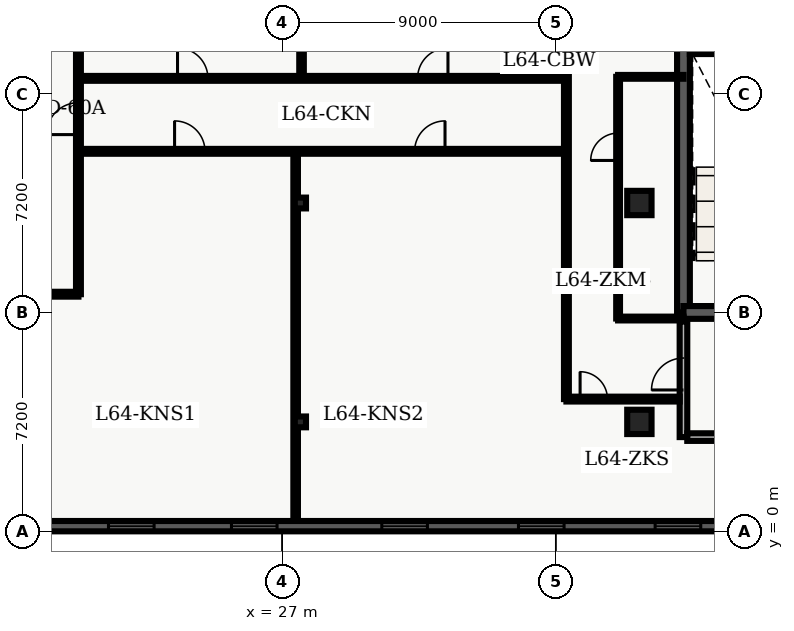
"""IFC4 building model, lengths in metres.
Left out: names, types, materials, properties, quantities, classifications, styles, units other than length and angle.
Written with IfcOpenShell. Run it as: python <this file> out.ifc"""

import sys

from ifc_helpers import new_model, entity, si_unit, converted_unit, direction, frame, origin_with_axes, origin_2d_with_axis, place, context, subcontext, project, spatial, polyline, rectangle, i_section, outline, extrude, element, fill, save


model = new_model("IFC4")
c1 = context("Model", 3, precision=1e-05, world=origin_with_axes(), true_north=direction((0.0, 1.0)))
c2 = subcontext(c1, "Body", "Model", "MODEL_VIEW")
j1 = project(units=[si_unit("LENGTHUNIT", "METRE"), converted_unit("PLANEANGLEUNIT", "DEGREE", entity("IfcPlaneAngleMeasure", 0.017), si_unit("PLANEANGLEUNIT", "RADIAN"), dimensions=[0, 0, 0, 0, 0, 0, 0])], contexts=[c1])
p1 = place(None, origin_with_axes())
s1 = spatial("IfcSite", under=j1, at=p1, CompositionType="ELEMENT")
p2 = place(p1, origin_with_axes())
s2 = spatial("IfcBuilding", under=s1, at=p2, CompositionType="ELEMENT")
p3 = place(p2, frame((0.0, 0.0, 260.7), z_axis=(0.0, 0.0, 1.0), x_axis=(1.0, 0.0, 0.0)))
s3 = spatial("IfcBuildingStorey", under=s2, at=p3, CompositionType="ELEMENT", Elevation=260.7)
p4 = place(p3, frame((40.2, 7.2, 0.0), z_axis=(0.0, 0.0, 1.0), x_axis=(0.0, 1.0, 0.0)))
e1 = element("IfcWall", 1, at=p4, inside=s3, PredefinedType="SHEAR", context=c2, shape_type="SweptSolid", body=[
    extrude(outline(polyline([(0.0, -0.21), (15.6, -0.21), (15.6, 0.21), (0.0, 0.21), (0.0, -0.21)])), origin_with_axes(), (0.0, 0.0, 1.0), 3.66),
])
p5 = place(p4, frame((12.75, 0.0, 0.0), z_axis=(0.0, 0.0, 1.0), x_axis=(1.0, 0.0, 0.0)))
e2 = element("IfcOpeningElement", 2, at=p5, cuts=e1, PredefinedType="OPENING", context=c2, shape_type="SweptSolid", body=[
    extrude(rectangle(XDim=1.2, YDim=0.44, at=origin_2d_with_axis()), origin_with_axes(), (0.0, 0.0, 1.0), 2.15),
])
p6 = place(p4, frame((9.3, 0.0, 0.0), z_axis=(0.0, 0.0, 1.0), x_axis=(1.0, 0.0, 0.0)))
e3 = element("IfcOpeningElement", 3, at=p6, cuts=e1, PredefinedType="OPENING", context=c2, shape_type="SweptSolid", body=[
    extrude(rectangle(XDim=0.9, YDim=0.44, at=origin_2d_with_axis()), origin_with_axes(), (0.0, 0.0, 1.0), 2.15),
])
p7 = place(p3, frame((40.2, 7.2, 0.0), z_axis=(0.0, 0.0, 1.0), x_axis=(1.0, 0.0, 0.0)))
e4 = element("IfcWall", 4, at=p7, inside=s3, PredefinedType="SHEAR", context=c2, shape_type="SweptSolid", body=[
    extrude(outline(polyline([(0.0, -0.21), (7.85, -0.21), (7.85, 0.21), (0.0, 0.21), (0.0, -0.21)])), origin_with_axes(), (0.0, 0.0, 1.0), 3.66),
])
p8 = place(p7, frame((2.175, 0.0, 0.0), z_axis=(0.0, 0.0, 1.0), x_axis=(1.0, 0.0, 0.0)))
e5 = element("IfcOpeningElement", 5, at=p8, cuts=e4, PredefinedType="OPENING", context=c2, shape_type="SweptSolid", body=[
    extrude(rectangle(XDim=1.05, YDim=0.44, at=origin_2d_with_axis()), origin_with_axes(), (0.0, 0.0, 1.0), 2.15),
])
p9 = place(p3, frame((40.41, 15.825, 0.0), z_axis=(0.0, 0.0, 1.0), x_axis=(1.0, 0.0, 0.0)))
e6 = element("IfcWall", 6, at=p9, inside=s3, PredefinedType="SHEAR", context=c2, shape_type="SweptSolid", body=[
    extrude(outline(polyline([(0.0, -0.125), (3.59, -0.125), (3.59, 0.125), (0.0, 0.125), (0.0, -0.125)])), origin_with_axes(), (0.0, 0.0, 1.0), 3.66),
])
p10 = place(p3, frame((40.2, 3.1, 0.0), z_axis=(0.0, 0.0, 1.0), x_axis=(0.0, 1.0, 0.0)))
e7 = element("IfcWall", 7, at=p10, inside=s3, PredefinedType="SOLIDWALL", context=c2, shape_type="SweptSolid", body=[
    extrude(outline(polyline([(0.0, -0.125), (3.8, -0.125), (3.8, 0.125), (0.0, 0.125), (0.0, -0.125)])), origin_with_axes(), (0.0, 0.0, 1.0), 2.7),
])
p11 = place(p10, frame((2.075, 0.0, 0.0), z_axis=(0.0, 0.0, 1.0), x_axis=(1.0, 0.0, 0.0)))
e8 = element("IfcOpeningElement", 8, at=p11, cuts=e7, PredefinedType="OPENING", context=c2, shape_type="SweptSolid", body=[
    extrude(rectangle(XDim=1.05, YDim=0.27, at=origin_2d_with_axis()), origin_with_axes(), (0.0, 0.0, 1.0), 2.15),
])
p12 = place(p3, frame((40.325, 3.1, 0.0), z_axis=(0.0, 0.0, 1.0), x_axis=(1.0, 0.0, 0.0)))
e9 = element("IfcWall", 9, at=p12, inside=s3, PredefinedType="SOLIDWALL", context=c2, shape_type="SweptSolid", body=[
    extrude(outline(polyline([(0.0, -0.125), (3.95, -0.125), (3.95, 0.125), (0.0, 0.125), (0.0, -0.125)])), origin_with_axes(), (0.0, 0.0, 1.0), 2.7),
])
for number, where, z_axis, x_axis in (
    (10, (27.6, 3.6, 0.0), (0.0, 0.0, 1.0), (1.0, 0.0, 0.0)),
    (11, (27.6, 10.8, 0.0), (0.0, 0.0, 1.0), (1.0, 0.0, 0.0)),
):
    element("IfcColumn", number, at=place(p3, frame(where, z_axis=z_axis, x_axis=x_axis)), inside=s3, PredefinedType="COLUMN", context=c2, shape_type="SweptSolid", body=[
        extrude(i_section(OverallWidth=0.369, OverallDepth=0.356, WebThickness=0.011, FlangeThickness=0.018, FilletRadius=0.018, at=origin_2d_with_axis()), origin_with_axes(), (0.0, 0.0, 1.0), 3.9),
    ])
for number, where, z_axis, x_axis in (
    (12, (38.75, 3.6, 0.0), (0.0, 0.0, 1.0), (1.0, 0.0, 0.0)),
    (13, (38.75, 10.8, 0.0), (0.0, 0.0, 1.0), (1.0, 0.0, 0.0)),
):
    element("IfcColumn", number, at=place(p3, frame(where, z_axis=z_axis, x_axis=x_axis)), inside=s3, PredefinedType="COLUMN", context=c2, shape_type="SweptSolid", body=[
        extrude(rectangle(XDim=0.8, YDim=0.8, at=origin_2d_with_axis()), origin_with_axes(), (0.0, 0.0, 1.0), 3.9),
    ])
p13 = place(p3, frame((8.135, 7.8, 0.0), z_axis=(0.0, 0.0, 1.0), x_axis=(1.0, 0.0, 0.0)))
e14 = element("IfcWall", 14, at=p13, inside=s3, PredefinedType="PARTITIONING", context=c2, shape_type="SweptSolid", body=[
    extrude(outline(polyline([(0.0, -0.08), (12.165, -0.08), (12.165, 0.08), (0.0, 0.08), (0.0, -0.08)])), origin_with_axes(), (0.0, 0.0, 1.0), 2.7),
])
p14 = place(p13, frame((3.979, 0.0, 0.0), z_axis=(0.0, 0.0, 1.0), x_axis=(1.0, 0.0, 0.0)))
e15 = element("IfcOpeningElement", 15, at=p14, cuts=e14, PredefinedType="OPENING", context=c2, shape_type="SweptSolid", body=[
    extrude(rectangle(XDim=1.0, YDim=0.18, at=origin_2d_with_axis()), origin_with_axes(), (0.0, 0.0, 1.0), 2.15),
])
p15 = place(p13, frame((8.778, 0.0, 0.0), z_axis=(0.0, 0.0, 1.0), x_axis=(1.0, 0.0, 0.0)))
e16 = element("IfcOpeningElement", 16, at=p15, cuts=e14, PredefinedType="OPENING", context=c2, shape_type="SweptSolid", body=[
    extrude(rectangle(XDim=1.0, YDim=0.18, at=origin_2d_with_axis()), origin_with_axes(), (0.0, 0.0, 1.0), 2.15),
])
p16 = place(p3, frame((20.3, 7.8, 0.0), z_axis=(0.0, 0.0, 1.0), x_axis=(0.0, 1.0, 0.0)))
e17 = element("IfcWall", 17, at=p16, inside=s3, PredefinedType="PARTITIONING", context=c2, shape_type="SweptSolid", body=[
    extrude(outline(polyline([(0.0, -0.08), (32.7, -0.08), (32.7, 0.08), (0.0, 0.08), (0.0, -0.08)])), origin_with_axes(), (0.0, 0.0, 1.0), 2.7),
])
p17 = place(p16, frame((17.825, 0.0, 0.0), z_axis=(0.0, 0.0, 1.0), x_axis=(1.0, 0.0, 0.0)))
e18 = element("IfcOpeningElement", 18, at=p17, cuts=e17, PredefinedType="OPENING", context=c2, shape_type="SweptSolid", body=[
    extrude(rectangle(XDim=1.0, YDim=0.18, at=origin_2d_with_axis()), origin_with_axes(), (0.0, 0.0, 1.0), 2.15),
])
p18 = place(p16, frame((27.345, 0.0, 0.0), z_axis=(0.0, 0.0, 1.0), x_axis=(1.0, 0.0, 0.0)))
e19 = element("IfcOpeningElement", 19, at=p18, cuts=e17, PredefinedType="OPENING", context=c2, shape_type="SweptSolid", body=[
    extrude(rectangle(XDim=1.0, YDim=0.18, at=origin_2d_with_axis()), origin_with_axes(), (0.0, 0.0, 1.0), 2.15),
])
p19 = place(p16, frame((5.775, 0.0, 0.0), z_axis=(0.0, 0.0, 1.0), x_axis=(1.0, 0.0, 0.0)))
e20 = element("IfcOpeningElement", 20, at=p19, cuts=e17, PredefinedType="OPENING", context=c2, shape_type="SweptSolid", body=[
    extrude(rectangle(XDim=1.05, YDim=0.18, at=origin_2d_with_axis()), origin_with_axes(), (0.0, 0.0, 1.0), 2.15),
])
p20 = place(p3, frame((20.3, 12.5, 0.0), z_axis=(0.0, 0.0, 1.0), x_axis=(1.0, 0.0, 0.0)))
e21 = element("IfcWall", 21, at=p20, inside=s3, PredefinedType="PARTITIONING", context=c2, shape_type="SweptSolid", body=[
    extrude(outline(polyline([(0.0, -0.08), (16.05, -0.08), (16.05, 0.08), (0.0, 0.08), (0.0, -0.08)])), origin_with_axes(), (0.0, 0.0, 1.0), 2.7),
])
p21 = place(p20, frame((3.662, 0.0, 0.0), z_axis=(0.0, 0.0, 1.0), x_axis=(1.0, 0.0, 0.0)))
e22 = element("IfcOpeningElement", 22, at=p21, cuts=e21, PredefinedType="OPENING", context=c2, shape_type="SweptSolid", body=[
    extrude(rectangle(XDim=1.0, YDim=0.18, at=origin_2d_with_axis()), origin_with_axes(), (0.0, 0.0, 1.0), 2.15),
])
p22 = place(p20, frame((11.557, 0.0, 0.0), z_axis=(0.0, 0.0, 1.0), x_axis=(1.0, 0.0, 0.0)))
e23 = element("IfcOpeningElement", 23, at=p22, cuts=e21, PredefinedType="OPENING", context=c2, shape_type="SweptSolid", body=[
    extrude(rectangle(XDim=1.0, YDim=0.18, at=origin_2d_with_axis()), origin_with_axes(), (0.0, 0.0, 1.0), 2.15),
])
p23 = place(p3, frame((20.3, 14.9, 0.0), z_axis=(0.0, 0.0, 1.0), x_axis=(1.0, 0.0, 0.0)))
e24 = element("IfcWall", 24, at=p23, inside=s3, PredefinedType="PARTITIONING", context=c2, shape_type="SweptSolid", body=[
    extrude(outline(polyline([(0.0, -0.08), (16.05, -0.08), (16.05, 0.08), (0.0, 0.08), (0.0, -0.08)])), origin_with_axes(), (0.0, 0.0, 1.0), 2.7),
])
p24 = place(p23, frame((3.759, 0.0, 0.0), z_axis=(0.0, 0.0, 1.0), x_axis=(1.0, 0.0, 0.0)))
e25 = element("IfcOpeningElement", 25, at=p24, cuts=e24, PredefinedType="OPENING", context=c2, shape_type="SweptSolid", body=[
    extrude(rectangle(XDim=1.0, YDim=0.18, at=origin_2d_with_axis()), origin_with_axes(), (0.0, 0.0, 1.0), 2.15),
])
p25 = place(p23, frame((11.654, 0.0, 0.0), z_axis=(0.0, 0.0, 1.0), x_axis=(1.0, 0.0, 0.0)))
e26 = element("IfcOpeningElement", 26, at=p25, cuts=e24, PredefinedType="OPENING", context=c2, shape_type="SweptSolid", body=[
    extrude(rectangle(XDim=1.0, YDim=0.18, at=origin_2d_with_axis()), origin_with_axes(), (0.0, 0.0, 1.0), 2.15),
])
p26 = place(p3, frame((36.35, 4.35, 0.0), z_axis=(0.0, 0.0, 1.0), x_axis=(0.0, 1.0, 0.0)))
e27 = element("IfcWall", 27, at=p26, inside=s3, PredefinedType="PARTITIONING", context=c2, shape_type="SweptSolid", body=[
    extrude(outline(polyline([(0.0, -0.08), (16.95, -0.08), (16.95, 0.08), (0.0, 0.08), (0.0, -0.08)])), origin_with_axes(), (0.0, 0.0, 1.0), 2.7),
])
p27 = place(p3, frame((27.444, 0.335, 0.0), z_axis=(0.0, 0.0, 1.0), x_axis=(0.0, 1.0, 0.0)))
e28 = element("IfcWall", 28, at=p27, inside=s3, PredefinedType="PARTITIONING", context=c2, shape_type="SweptSolid", body=[
    extrude(outline(polyline([(0.0, -0.075), (12.045, -0.075), (12.045, 0.075), (0.0, 0.075), (0.0, -0.075)])), origin_with_axes(), (0.0, 0.0, 1.0), 2.7),
])
p28 = place(p3, frame((27.638, 15.02, 0.0), z_axis=(0.0, 0.0, 1.0), x_axis=(0.0, 1.0, 0.0)))
e29 = element("IfcWall", 29, at=p28, inside=s3, PredefinedType="PARTITIONING", context=c2, shape_type="SweptSolid", body=[
    extrude(outline(polyline([(0.0, -0.075), (6.2, -0.075), (6.2, 0.075), (0.0, 0.075), (0.0, -0.075)])), origin_with_axes(), (0.0, 0.0, 1.0), 2.7),
])
p29 = place(p3, frame((36.35, 4.35, 0.0), z_axis=(0.0, 0.0, 1.0), x_axis=(1.0, 0.0, 0.0)))
e30 = element("IfcWall", 30, at=p29, inside=s3, PredefinedType="PARTITIONING", context=c2, shape_type="SweptSolid", body=[
    extrude(outline(polyline([(0.0, -0.08), (3.725, -0.08), (3.725, 0.08), (0.0, 0.08), (0.0, -0.08)])), origin_with_axes(), (0.0, 0.0, 1.0), 2.7),
])
p30 = place(p29, frame((0.9, 0.0, 0.0), z_axis=(0.0, 0.0, 1.0), x_axis=(1.0, 0.0, 0.0)))
e31 = element("IfcOpeningElement", 31, at=p30, cuts=e30, PredefinedType="OPENING", context=c2, shape_type="SweptSolid", body=[
    extrude(rectangle(XDim=0.9, YDim=0.18, at=origin_2d_with_axis()), origin_with_axes(), (0.0, 0.0, 1.0), 2.15),
])
for number, where, z_axis, x_axis in (
    (32, (38.05, 7.0, 0.0), (0.0, 0.0, 1.0), (1.0, 0.0, 0.0)),
    (33, (38.05, 14.95, 0.0), (0.0, 0.0, 1.0), (1.0, 0.0, 0.0)),
):
    element("IfcWall", number, at=place(p3, frame(where, z_axis=z_axis, x_axis=x_axis)), inside=s3, PredefinedType="PARTITIONING", context=c2, shape_type="SweptSolid", body=[
        extrude(outline(polyline([(0.0, -0.062), (2.15, -0.062), (2.15, 0.062), (0.0, 0.062), (0.0, -0.062)])), origin_with_axes(), (0.0, 0.0, 1.0), 2.7),
    ])
p31 = place(p3, frame((38.05, 7.0, 0.0), z_axis=(0.0, 0.0, 1.0), x_axis=(0.0, 1.0, 0.0)))
e34 = element("IfcWall", 34, at=p31, inside=s3, PredefinedType="PARTITIONING", context=c2, shape_type="SweptSolid", body=[
    extrude(outline(polyline([(0.0, -0.062), (7.95, -0.062), (7.95, 0.062), (0.0, 0.062), (0.0, -0.062)])), origin_with_axes(), (0.0, 0.0, 1.0), 2.7),
])
p32 = place(p31, frame((5.65, 0.0, 0.0), z_axis=(0.0, 0.0, 1.0), x_axis=(1.0, 0.0, 0.0)))
e35 = element("IfcOpeningElement", 35, at=p32, cuts=e34, PredefinedType="OPENING", context=c2, shape_type="SweptSolid", body=[
    extrude(rectangle(XDim=0.9, YDim=0.145, at=origin_2d_with_axis()), origin_with_axes(), (0.0, 0.0, 1.0), 2.15),
])
p33 = place(p3, frame((47.36, 0.17, 0.0), z_axis=(0.0, 0.0, 1.0), x_axis=(-1.0, 0.0, 0.0)))
e36 = element("IfcWall", 36, at=p33, inside=s3, PredefinedType="SOLIDWALL", context=c2, shape_type="SweptSolid", body=[
    extrude(outline(polyline([(0.0, -0.17), (37.16, -0.17), (37.16, 0.17), (0.0, 0.17), (0.0, -0.17)])), origin_with_axes(), (0.0, 0.0, 1.0), 3.66),
])
p34 = place(p33, frame((2.847, 0.0, 0.45), z_axis=(0.0, 0.0, 1.0), x_axis=(1.0, 0.0, 0.0)))
e37 = element("IfcOpeningElement", 37, at=p34, cuts=e36, PredefinedType="OPENING", context=c2, shape_type="SweptSolid", body=[
    extrude(rectangle(XDim=1.5, YDim=0.36, at=origin_2d_with_axis()), origin_with_axes(), (0.0, 0.0, 1.0), 2.1),
])
p35 = place(p33, frame((7.342, 0.0, 0.45), z_axis=(0.0, 0.0, 1.0), x_axis=(1.0, 0.0, 0.0)))
e38 = element("IfcOpeningElement", 38, at=p35, cuts=e36, PredefinedType="OPENING", context=c2, shape_type="SweptSolid", body=[
    extrude(rectangle(XDim=1.5, YDim=0.36, at=origin_2d_with_axis()), origin_with_axes(), (0.0, 0.0, 1.0), 2.1),
])
p36 = place(p33, frame((11.837, 0.0, 0.45), z_axis=(0.0, 0.0, 1.0), x_axis=(1.0, 0.0, 0.0)))
e39 = element("IfcOpeningElement", 39, at=p36, cuts=e36, PredefinedType="OPENING", context=c2, shape_type="SweptSolid", body=[
    extrude(rectangle(XDim=1.5, YDim=0.36, at=origin_2d_with_axis()), origin_with_axes(), (0.0, 0.0, 1.0), 2.1),
])
p37 = place(p33, frame((16.332, 0.0, 0.45), z_axis=(0.0, 0.0, 1.0), x_axis=(1.0, 0.0, 0.0)))
e40 = element("IfcOpeningElement", 40, at=p37, cuts=e36, PredefinedType="OPENING", context=c2, shape_type="SweptSolid", body=[
    extrude(rectangle(XDim=1.5, YDim=0.36, at=origin_2d_with_axis()), origin_with_axes(), (0.0, 0.0, 1.0), 2.1),
])
p38 = place(p33, frame((21.277, 0.0, 0.45), z_axis=(0.0, 0.0, 1.0), x_axis=(1.0, 0.0, 0.0)))
e41 = element("IfcOpeningElement", 41, at=p38, cuts=e36, PredefinedType="OPENING", context=c2, shape_type="SweptSolid", body=[
    extrude(rectangle(XDim=1.5, YDim=0.36, at=origin_2d_with_axis()), origin_with_axes(), (0.0, 0.0, 1.0), 2.1),
])
p39 = place(p33, frame((25.322, 0.0, 0.45), z_axis=(0.0, 0.0, 1.0), x_axis=(1.0, 0.0, 0.0)))
e42 = element("IfcOpeningElement", 42, at=p39, cuts=e36, PredefinedType="OPENING", context=c2, shape_type="SweptSolid", body=[
    extrude(rectangle(XDim=1.5, YDim=0.36, at=origin_2d_with_axis()), origin_with_axes(), (0.0, 0.0, 1.0), 2.1),
])
p40 = place(p33, frame((29.817, 0.0, 0.45), z_axis=(0.0, 0.0, 1.0), x_axis=(1.0, 0.0, 0.0)))
e43 = element("IfcOpeningElement", 43, at=p40, cuts=e36, PredefinedType="OPENING", context=c2, shape_type="SweptSolid", body=[
    extrude(rectangle(XDim=1.5, YDim=0.36, at=origin_2d_with_axis()), origin_with_axes(), (0.0, 0.0, 1.0), 2.1),
])
p41 = place(p33, frame((34.312, 0.0, 0.45), z_axis=(0.0, 0.0, 1.0), x_axis=(1.0, 0.0, 0.0)))
e44 = element("IfcOpeningElement", 44, at=p41, cuts=e36, PredefinedType="OPENING", context=c2, shape_type="SweptSolid", body=[
    extrude(rectangle(XDim=1.5, YDim=0.36, at=origin_2d_with_axis()), origin_with_axes(), (0.0, 0.0, 1.0), 2.1),
])
p42 = place(p10, frame((2.075, 0.0, 0.0), z_axis=(0.0, 0.0, 1.0), x_axis=(1.0, 0.0, 0.0)))
e45 = element("IfcDoor", 45, at=p42, inside=s3, OperationType="SINGLE_SWING_LEFT", PredefinedType="DOOR", context=c2, shape_type="SweptSolid", body=[
    extrude(rectangle(XDim=1.05, YDim=0.09, at=origin_2d_with_axis()), origin_with_axes(), (0.0, 0.0, 1.0), 2.15),
])
fill(e8, e45)
p43 = place(p16, frame((5.775, 0.0, 0.0), z_axis=(0.0, 0.0, 1.0), x_axis=(1.0, 0.0, 0.0)))
e46 = element("IfcDoor", 46, at=p43, inside=s3, OperationType="SINGLE_SWING_LEFT", PredefinedType="DOOR", context=c2, shape_type="SweptSolid", body=[
    extrude(rectangle(XDim=1.05, YDim=0.09, at=origin_2d_with_axis()), origin_with_axes(), (0.0, 0.0, 1.0), 2.15),
])
fill(e20, e46)
p44 = place(p20, frame((3.662, 0.0, 0.0), z_axis=(0.0, 0.0, 1.0), x_axis=(1.0, 0.0, 0.0)))
e47 = element("IfcDoor", 47, at=p44, inside=s3, OperationType="SINGLE_SWING_LEFT", PredefinedType="DOOR", context=c2, shape_type="SweptSolid", body=[
    extrude(rectangle(XDim=1.0, YDim=0.09, at=origin_2d_with_axis()), origin_with_axes(), (0.0, 0.0, 1.0), 2.15),
])
fill(e22, e47)
p45 = place(p20, frame((11.557, 0.0, 0.0), z_axis=(0.0, 0.0, 1.0), x_axis=(1.0, 0.0, 0.0)))
e48 = element("IfcDoor", 48, at=p45, inside=s3, OperationType="SINGLE_SWING_RIGHT", PredefinedType="DOOR", context=c2, shape_type="SweptSolid", body=[
    extrude(rectangle(XDim=1.0, YDim=0.09, at=origin_2d_with_axis()), origin_with_axes(), (0.0, 0.0, 1.0), 2.15),
])
fill(e23, e48)
p46 = place(p23, frame((3.759, 0.0, 0.0), z_axis=(0.0, 0.0, 1.0), x_axis=(1.0, 0.0, 0.0)))
e49 = element("IfcDoor", 49, at=p46, inside=s3, OperationType="SINGLE_SWING_LEFT", PredefinedType="DOOR", context=c2, shape_type="SweptSolid", body=[
    extrude(rectangle(XDim=1.0, YDim=0.09, at=origin_2d_with_axis()), origin_with_axes(), (0.0, 0.0, 1.0), 2.15),
])
fill(e25, e49)
p47 = place(p23, frame((11.654, 0.0, 0.0), z_axis=(0.0, 0.0, 1.0), x_axis=(1.0, 0.0, 0.0)))
e50 = element("IfcDoor", 50, at=p47, inside=s3, OperationType="SINGLE_SWING_RIGHT", PredefinedType="DOOR", context=c2, shape_type="SweptSolid", body=[
    extrude(rectangle(XDim=1.0, YDim=0.09, at=origin_2d_with_axis()), origin_with_axes(), (0.0, 0.0, 1.0), 2.15),
])
fill(e26, e50)
p48 = place(p29, frame((0.9, 0.0, 0.0), z_axis=(0.0, 0.0, 1.0), x_axis=(1.0, 0.0, 0.0)))
e51 = element("IfcDoor", 51, at=p48, inside=s3, OperationType="SINGLE_SWING_LEFT", PredefinedType="DOOR", context=c2, shape_type="SweptSolid", body=[
    extrude(rectangle(XDim=0.9, YDim=0.09, at=origin_2d_with_axis()), origin_with_axes(), (0.0, 0.0, 1.0), 2.15),
])
fill(e31, e51)
p49 = place(p31, frame((5.65, 0.0, 0.0), z_axis=(0.0, 0.0, 1.0), x_axis=(1.0, 0.0, 0.0)))
e52 = element("IfcDoor", 52, at=p49, inside=s3, OperationType="SINGLE_SWING_LEFT", PredefinedType="DOOR", context=c2, shape_type="SweptSolid", body=[
    extrude(rectangle(XDim=0.9, YDim=0.075, at=origin_2d_with_axis()), origin_with_axes(), (0.0, 0.0, 1.0), 2.15),
])
fill(e35, e52)
p50 = place(p33, frame((7.342, 0.0, 0.45), z_axis=(0.0, 0.0, 1.0), x_axis=(1.0, 0.0, 0.0)))
e53 = element("IfcWindow", 53, at=p50, inside=s3, PredefinedType="WINDOW", context=c2, shape_type="SweptSolid", body=[
    extrude(rectangle(XDim=1.5, YDim=0.09, at=origin_2d_with_axis()), origin_with_axes(), (0.0, 0.0, 1.0), 2.1),
])
fill(e38, e53)
p51 = place(p33, frame((11.837, 0.0, 0.45), z_axis=(0.0, 0.0, 1.0), x_axis=(1.0, 0.0, 0.0)))
e54 = element("IfcWindow", 54, at=p51, inside=s3, PredefinedType="WINDOW", context=c2, shape_type="SweptSolid", body=[
    extrude(rectangle(XDim=1.5, YDim=0.09, at=origin_2d_with_axis()), origin_with_axes(), (0.0, 0.0, 1.0), 2.1),
])
fill(e39, e54)
p52 = place(p33, frame((16.332, 0.0, 0.45), z_axis=(0.0, 0.0, 1.0), x_axis=(1.0, 0.0, 0.0)))
e55 = element("IfcWindow", 55, at=p52, inside=s3, PredefinedType="WINDOW", context=c2, shape_type="SweptSolid", body=[
    extrude(rectangle(XDim=1.5, YDim=0.09, at=origin_2d_with_axis()), origin_with_axes(), (0.0, 0.0, 1.0), 2.1),
])
fill(e40, e55)
p53 = place(p33, frame((21.277, 0.0, 0.45), z_axis=(0.0, 0.0, 1.0), x_axis=(1.0, 0.0, 0.0)))
e56 = element("IfcWindow", 56, at=p53, inside=s3, PredefinedType="WINDOW", context=c2, shape_type="SweptSolid", body=[
    extrude(rectangle(XDim=1.5, YDim=0.09, at=origin_2d_with_axis()), origin_with_axes(), (0.0, 0.0, 1.0), 2.1),
])
fill(e41, e56)
p54 = place(p33, frame((25.322, 0.0, 0.45), z_axis=(0.0, 0.0, 1.0), x_axis=(1.0, 0.0, 0.0)))
e57 = element("IfcWindow", 57, at=p54, inside=s3, PredefinedType="WINDOW", context=c2, shape_type="SweptSolid", body=[
    extrude(rectangle(XDim=1.5, YDim=0.09, at=origin_2d_with_axis()), origin_with_axes(), (0.0, 0.0, 1.0), 2.1),
])
fill(e42, e57)
save(model, sys.argv[1])
